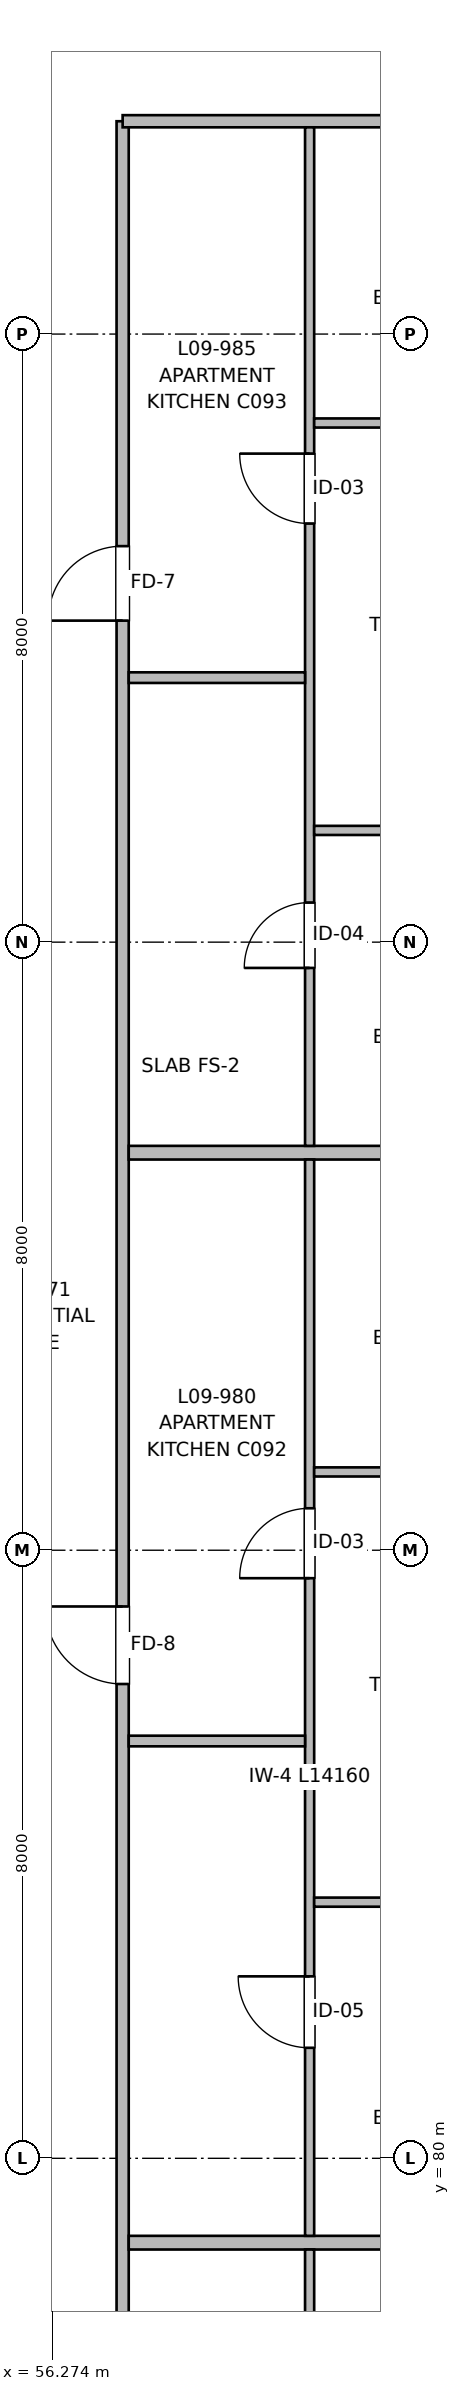
"""IFC4 building model, lengths in metres.
Left out: names, types, materials, properties, quantities, classifications, styles, units other than length and angle.
Written with IfcOpenShell. Run it as: python <this file> out.ifc"""

import sys

from ifc_helpers import new_model, si_unit, direction, frame, frame_2d, origin, place, context, subcontext, project, spatial, rectangle, extrude, element, fill, save


model = new_model("IFC4")
c1 = context("Model", 3, precision=1e-05, world=origin(), true_north=direction((0.0, 1.0)))
c2 = subcontext(c1, "Body", "Model", "MODEL_VIEW")
j1 = project(units=[si_unit("LENGTHUNIT", "METRE"), si_unit("PLANEANGLEUNIT", "RADIAN")], contexts=[c1])
p1 = place(None, origin())
s1 = spatial("IfcSite", under=j1, at=p1, CompositionType="ELEMENT")
p2 = place(p1, origin())
s2 = spatial("IfcBuilding", under=s1, at=p2, CompositionType="ELEMENT")
p3 = place(p2, frame((0.0, 0.0, 29.76)))
s3 = spatial("IfcBuildingStorey", under=s2, at=p3, CompositionType="ELEMENT", Elevation=29.76)
p4 = place(p3, frame((57.2, 64.56, 0.0), z_axis=(0.0, 0.0, 1.0), x_axis=(0.0, 1.0, 0.0)))
e1 = element("IfcWall", 1, at=p4, inside=s3, PredefinedType="PARTITIONING", context=c2, shape_type="SweptSolid", body=[
    extrude(rectangle(XDim=42.24, YDim=0.16, at=frame_2d((21.12, 0.0))), origin(), (0.0, 0.0, 1.0), 2.935),
])
p5 = place(p4, frame((7.3, 0.0, 0.0)))
e2 = element("IfcOpeningElement", 2, at=p5, cuts=e1, PredefinedType="OPENING", context=c2, shape_type="SweptSolid", body=[
    extrude(rectangle(XDim=0.98, YDim=2.15, at=frame_2d((0.49, 1.075))), frame((0.0, 0.09, 0.0), z_axis=(0.0, -1.0, 0.0), x_axis=(1.0, 0.0, 0.0)), (0.0, 0.0, 1.0), 0.18),
])
p6 = place(p4, frame((21.68, 0.0, 0.0)))
e3 = element("IfcOpeningElement", 3, at=p6, cuts=e1, PredefinedType="OPENING", context=c2, shape_type="SweptSolid", body=[
    extrude(rectangle(XDim=1.02, YDim=2.15, at=frame_2d((0.51, 1.075))), frame((0.0, 0.09, 0.0), z_axis=(0.0, -1.0, 0.0), x_axis=(1.0, 0.0, 0.0)), (0.0, 0.0, 1.0), 0.18),
])
p7 = place(p4, frame((35.67, 0.0, 0.0)))
e4 = element("IfcOpeningElement", 4, at=p7, cuts=e1, PredefinedType="OPENING", context=c2, shape_type="SweptSolid", body=[
    extrude(rectangle(XDim=0.98, YDim=2.15, at=frame_2d((0.49, 1.075))), frame((0.0, 0.09, 0.0), z_axis=(0.0, -1.0, 0.0), x_axis=(1.0, 0.0, 0.0)), (0.0, 0.0, 1.0), 0.18),
])
p8 = place(p3, frame((57.2, 106.8, 0.0), z_axis=(0.0, 0.0, 1.0), x_axis=(1.0, 0.0, 0.0)))
e5 = element("IfcWall", 5, at=p8, inside=s3, PredefinedType="PARTITIONING", context=c2, shape_type="SweptSolid", body=[
    extrude(rectangle(XDim=24.14, YDim=0.16, at=frame_2d((12.07, 0.0))), origin(), (0.0, 0.0, 1.0), 2.935),
])
p9 = place(p8, frame((19.575, 0.0, 0.0)))
e6 = element("IfcOpeningElement", 6, at=p9, cuts=e5, PredefinedType="OPENING", context=c2, shape_type="SweptSolid", body=[
    extrude(rectangle(XDim=1.05, YDim=2.15, at=frame_2d((0.525, 1.075))), frame((0.0, 0.09, 0.0), z_axis=(0.0, -1.0, 0.0), x_axis=(1.0, 0.0, 0.0)), (0.0, 0.0, 1.0), 0.18),
])
p10 = place(p8, frame((8.995, 0.0, 0.0)))
e7 = element("IfcOpeningElement", 7, at=p10, cuts=e5, PredefinedType="OPENING", context=c2, shape_type="SweptSolid", body=[
    extrude(rectangle(XDim=0.98, YDim=2.15, at=frame_2d((0.49, 1.075))), frame((0.0, 0.09, 0.0), z_axis=(0.0, -1.0, 0.0), x_axis=(1.0, 0.0, 0.0)), (0.0, 0.0, 1.0), 0.18),
])
p11 = place(p3, frame((57.28, 78.89, 0.0), z_axis=(0.0, 0.0, 1.0), x_axis=(1.0, 0.0, 0.0)))
e8 = element("IfcWall", 8, at=p11, inside=s3, PredefinedType="PARTITIONING", context=c2, shape_type="SweptSolid", body=[
    extrude(rectangle(XDim=6.59, YDim=0.18, at=frame_2d((3.295, 0.0))), origin(), (0.0, 0.0, 1.0), 2.935),
])
p12 = place(p3, frame((57.28, 93.23, 0.0), z_axis=(0.0, 0.0, 1.0), x_axis=(1.0, 0.0, 0.0)))
e9 = element("IfcWall", 9, at=p12, inside=s3, PredefinedType="PARTITIONING", context=c2, shape_type="SweptSolid", body=[
    extrude(rectangle(XDim=11.017, YDim=0.18, at=frame_2d((5.509, 0.0))), origin(), (0.0, 0.0, 1.0), 2.935),
])
p13 = place(p3, frame((59.66, 64.56, 0.0), z_axis=(0.0, 0.0, 1.0), x_axis=(0.0, 1.0, 0.0)))
e10 = element("IfcWall", 10, at=p13, inside=s3, PredefinedType="PARTITIONING", context=c2, shape_type="SweptSolid", body=[
    extrude(rectangle(XDim=14.24, YDim=0.12, at=frame_2d((7.12, 0.0))), origin(), (0.0, 0.0, 1.0), 2.935),
])
p14 = place(p13, frame((2.489, 0.0, 0.0)))
e11 = element("IfcOpeningElement", 11, at=p14, cuts=e10, PredefinedType="OPENING", context=c2, shape_type="SweptSolid", body=[
    extrude(rectangle(XDim=0.86, YDim=2.1, at=frame_2d((0.43, 1.05))), frame((0.0, 0.07, 0.0), z_axis=(0.0, -1.0, 0.0), x_axis=(1.0, 0.0, 0.0)), (0.0, 0.0, 1.0), 0.14),
])
p15 = place(p13, frame((8.703, 0.0, 0.0)))
e12 = element("IfcOpeningElement", 12, at=p15, cuts=e10, PredefinedType="OPENING", context=c2, shape_type="SweptSolid", body=[
    extrude(rectangle(XDim=0.92, YDim=2.1, at=frame_2d((0.46, 1.05))), frame((0.0, 0.07, 0.0), z_axis=(0.0, -1.0, 0.0), x_axis=(1.0, 0.0, 0.0)), (0.0, 0.0, 1.0), 0.14),
])
p16 = place(p3, frame((59.66, 78.98, 0.0), z_axis=(0.0, 0.0, 1.0), x_axis=(0.0, 1.0, 0.0)))
e13 = element("IfcWall", 13, at=p16, inside=s3, PredefinedType="PARTITIONING", context=c2, shape_type="SweptSolid", body=[
    extrude(rectangle(XDim=14.16, YDim=0.12, at=frame_2d((7.08, 0.0))), origin(), (0.0, 0.0, 1.0), 2.935),
])
p17 = place(p16, frame((2.474, 0.0, 0.0)))
e14 = element("IfcOpeningElement", 14, at=p17, cuts=e13, PredefinedType="OPENING", context=c2, shape_type="SweptSolid", body=[
    extrude(rectangle(XDim=0.94, YDim=2.1, at=frame_2d((0.47, 1.05))), frame((0.0, 0.07, 0.0), z_axis=(0.0, -1.0, 0.0), x_axis=(1.0, 0.0, 0.0)), (0.0, 0.0, 1.0), 0.14),
])
p18 = place(p16, frame((8.652, 0.0, 0.0)))
e15 = element("IfcOpeningElement", 15, at=p18, cuts=e13, PredefinedType="OPENING", context=c2, shape_type="SweptSolid", body=[
    extrude(rectangle(XDim=0.92, YDim=2.1, at=frame_2d((0.46, 1.05))), frame((0.0, 0.07, 0.0), z_axis=(0.0, -1.0, 0.0), x_axis=(1.0, 0.0, 0.0)), (0.0, 0.0, 1.0), 0.14),
])
p19 = place(p3, frame((57.28, 85.49, 0.0), z_axis=(0.0, 0.0, 1.0), x_axis=(1.0, 0.0, 0.0)))
e16 = element("IfcWall", 16, at=p19, inside=s3, PredefinedType="PARTITIONING", context=c2, shape_type="SweptSolid", body=[
    extrude(rectangle(XDim=2.32, YDim=0.14, at=frame_2d((1.16, 0.0))), origin(), (0.0, 0.0, 1.0), 2.935),
])
p20 = place(p3, frame((59.72, 83.37, 0.0), z_axis=(0.0, 0.0, 1.0), x_axis=(1.0, 0.0, 0.0)))
e17 = element("IfcWall", 17, at=p20, inside=s3, PredefinedType="PARTITIONING", context=c2, shape_type="SweptSolid", body=[
    extrude(rectangle(XDim=4.15, YDim=0.12, at=frame_2d((2.075, 0.0))), origin(), (0.0, 0.0, 1.0), 2.935),
])
p21 = place(p20, frame((1.625, 0.0, 0.0)))
e18 = element("IfcOpeningElement", 18, at=p21, cuts=e17, PredefinedType="OPENING", context=c2, shape_type="SweptSolid", body=[
    extrude(rectangle(XDim=0.9, YDim=2.1, at=frame_2d((0.45, 1.05))), frame((0.0, 0.07, 0.0), z_axis=(0.0, -1.0, 0.0), x_axis=(1.0, 0.0, 0.0)), (0.0, 0.0, 1.0), 0.14),
])
p22 = place(p3, frame((59.72, 89.03, 0.0), z_axis=(0.0, 0.0, 1.0), x_axis=(1.0, 0.0, 0.0)))
e19 = element("IfcWall", 19, at=p22, inside=s3, PredefinedType="PARTITIONING", context=c2, shape_type="SweptSolid", body=[
    extrude(rectangle(XDim=5.055, YDim=0.12, at=frame_2d((2.527, 0.0))), origin(), (0.0, 0.0, 1.0), 2.935),
])
p23 = place(p22, frame((1.635, 0.0, 0.0)))
e20 = element("IfcOpeningElement", 20, at=p23, cuts=e19, PredefinedType="OPENING", context=c2, shape_type="SweptSolid", body=[
    extrude(rectangle(XDim=0.88, YDim=2.1, at=frame_2d((0.44, 1.05))), frame((0.0, 0.07, 0.0), z_axis=(0.0, -1.0, 0.0), x_axis=(1.0, 0.0, 0.0)), (0.0, 0.0, 1.0), 0.14),
])
p24 = place(p3, frame((59.66, 93.32, 0.0), z_axis=(0.0, 0.0, 1.0), x_axis=(0.0, 1.0, 0.0)))
e21 = element("IfcWall", 21, at=p24, inside=s3, PredefinedType="PARTITIONING", context=c2, shape_type="SweptSolid", body=[
    extrude(rectangle(XDim=13.4, YDim=0.12, at=frame_2d((6.7, 0.0))), origin(), (0.0, 0.0, 1.0), 2.935),
])
p25 = place(p24, frame((2.341, 0.0, 0.0)))
e22 = element("IfcOpeningElement", 22, at=p25, cuts=e21, PredefinedType="OPENING", context=c2, shape_type="SweptSolid", body=[
    extrude(rectangle(XDim=0.86, YDim=2.1, at=frame_2d((0.43, 1.05))), frame((0.0, 0.07, 0.0), z_axis=(0.0, -1.0, 0.0), x_axis=(1.0, 0.0, 0.0)), (0.0, 0.0, 1.0), 0.14),
])
p26 = place(p24, frame((8.187, 0.0, 0.0)))
e23 = element("IfcOpeningElement", 23, at=p26, cuts=e21, PredefinedType="OPENING", context=c2, shape_type="SweptSolid", body=[
    extrude(rectangle(XDim=0.92, YDim=2.1, at=frame_2d((0.46, 1.05))), frame((0.0, 0.07, 0.0), z_axis=(0.0, -1.0, 0.0), x_axis=(1.0, 0.0, 0.0)), (0.0, 0.0, 1.0), 0.14),
])
p27 = place(p3, frame((57.28, 99.48, 0.0), z_axis=(0.0, 0.0, 1.0), x_axis=(1.0, 0.0, 0.0)))
e24 = element("IfcWall", 24, at=p27, inside=s3, PredefinedType="PARTITIONING", context=c2, shape_type="SweptSolid", body=[
    extrude(rectangle(XDim=2.32, YDim=0.14, at=frame_2d((1.16, 0.0))), origin(), (0.0, 0.0, 1.0), 2.935),
])
p28 = place(p3, frame((59.72, 97.47, 0.0), z_axis=(0.0, 0.0, 1.0), x_axis=(1.0, 0.0, 0.0)))
e25 = element("IfcWall", 25, at=p28, inside=s3, PredefinedType="PARTITIONING", context=c2, shape_type="SweptSolid", body=[
    extrude(rectangle(XDim=13.062, YDim=0.12, at=frame_2d((6.531, 0.0))), origin(), (0.0, 0.0, 1.0), 2.935),
])
p29 = place(p28, frame((1.645, 0.0, 0.0)))
e26 = element("IfcOpeningElement", 26, at=p29, cuts=e25, PredefinedType="OPENING", context=c2, shape_type="SweptSolid", body=[
    extrude(rectangle(XDim=0.9, YDim=2.1, at=frame_2d((0.45, 1.05))), frame((0.0, 0.07, 0.0), z_axis=(0.0, -1.0, 0.0), x_axis=(1.0, 0.0, 0.0)), (0.0, 0.0, 1.0), 0.14),
])
p30 = place(p3, frame((59.72, 102.83, 0.0), z_axis=(0.0, 0.0, 1.0), x_axis=(1.0, 0.0, 0.0)))
e27 = element("IfcWall", 27, at=p30, inside=s3, PredefinedType="PARTITIONING", context=c2, shape_type="SweptSolid", body=[
    extrude(rectangle(XDim=4.19, YDim=0.12, at=frame_2d((2.095, 0.0))), origin(), (0.0, 0.0, 1.0), 2.935),
])
p31 = place(p30, frame((1.655, 0.0, 0.0)))
e28 = element("IfcOpeningElement", 28, at=p31, cuts=e27, PredefinedType="OPENING", context=c2, shape_type="SweptSolid", body=[
    extrude(rectangle(XDim=0.88, YDim=2.1, at=frame_2d((0.44, 1.05))), frame((0.0, 0.07, 0.0), z_axis=(0.0, -1.0, 0.0), x_axis=(1.0, 0.0, 0.0)), (0.0, 0.0, 1.0), 0.14),
])
p32 = place(p17, origin())
e29 = element("IfcDoor", 29, at=p32, inside=s3, OperationType="SINGLE_SWING_RIGHT", PredefinedType="DOOR", context=c2, shape_type="SweptSolid", body=[
    extrude(rectangle(XDim=0.94, YDim=2.1, at=frame_2d((0.47, 1.05))), frame((0.0, 0.025, 0.0), z_axis=(0.0, -1.0, 0.0), x_axis=(1.0, 0.0, 0.0)), (0.0, 0.0, 1.0), 0.05),
])
fill(e14, e29)
p33 = place(p18, origin())
e30 = element("IfcDoor", 30, at=p33, inside=s3, OperationType="SINGLE_SWING_LEFT", PredefinedType="DOOR", context=c2, shape_type="SweptSolid", body=[
    extrude(rectangle(XDim=0.92, YDim=2.1, at=frame_2d((0.46, 1.05))), frame((0.0, 0.025, 0.0), z_axis=(0.0, -1.0, 0.0), x_axis=(1.0, 0.0, 0.0)), (0.0, 0.0, 1.0), 0.05),
])
fill(e15, e30)
p34 = place(p6, origin())
e31 = element("IfcDoor", 31, at=p34, inside=s3, OperationType="SINGLE_SWING_RIGHT", PredefinedType="DOOR", context=c2, shape_type="SweptSolid", body=[
    extrude(rectangle(XDim=1.02, YDim=2.15, at=frame_2d((0.51, 1.075))), frame((0.0, 0.025, 0.0), z_axis=(0.0, -1.0, 0.0), x_axis=(1.0, 0.0, 0.0)), (0.0, 0.0, 1.0), 0.05),
])
fill(e3, e31)
p35 = place(p25, origin())
e32 = element("IfcDoor", 32, at=p35, inside=s3, OperationType="SINGLE_SWING_LEFT", PredefinedType="DOOR", context=c2, shape_type="SweptSolid", body=[
    extrude(rectangle(XDim=0.86, YDim=2.1, at=frame_2d((0.43, 1.05))), frame((0.0, 0.025, 0.0), z_axis=(0.0, -1.0, 0.0), x_axis=(1.0, 0.0, 0.0)), (0.0, 0.0, 1.0), 0.05),
])
fill(e22, e32)
p36 = place(p26, origin())
e33 = element("IfcDoor", 33, at=p36, inside=s3, OperationType="SINGLE_SWING_RIGHT", PredefinedType="DOOR", context=c2, shape_type="SweptSolid", body=[
    extrude(rectangle(XDim=0.92, YDim=2.1, at=frame_2d((0.46, 1.05))), frame((0.0, 0.025, 0.0), z_axis=(0.0, -1.0, 0.0), x_axis=(1.0, 0.0, 0.0)), (0.0, 0.0, 1.0), 0.05),
])
fill(e23, e33)
p37 = place(p7, origin())
e34 = element("IfcDoor", 34, at=p37, inside=s3, OperationType="SINGLE_SWING_LEFT", PredefinedType="DOOR", context=c2, shape_type="SweptSolid", body=[
    extrude(rectangle(XDim=0.98, YDim=2.15, at=frame_2d((0.49, 1.075))), frame((0.0, 0.025, 0.0), z_axis=(0.0, -1.0, 0.0), x_axis=(1.0, 0.0, 0.0)), (0.0, 0.0, 1.0), 0.05),
])
fill(e4, e34)
save(model, sys.argv[1])
